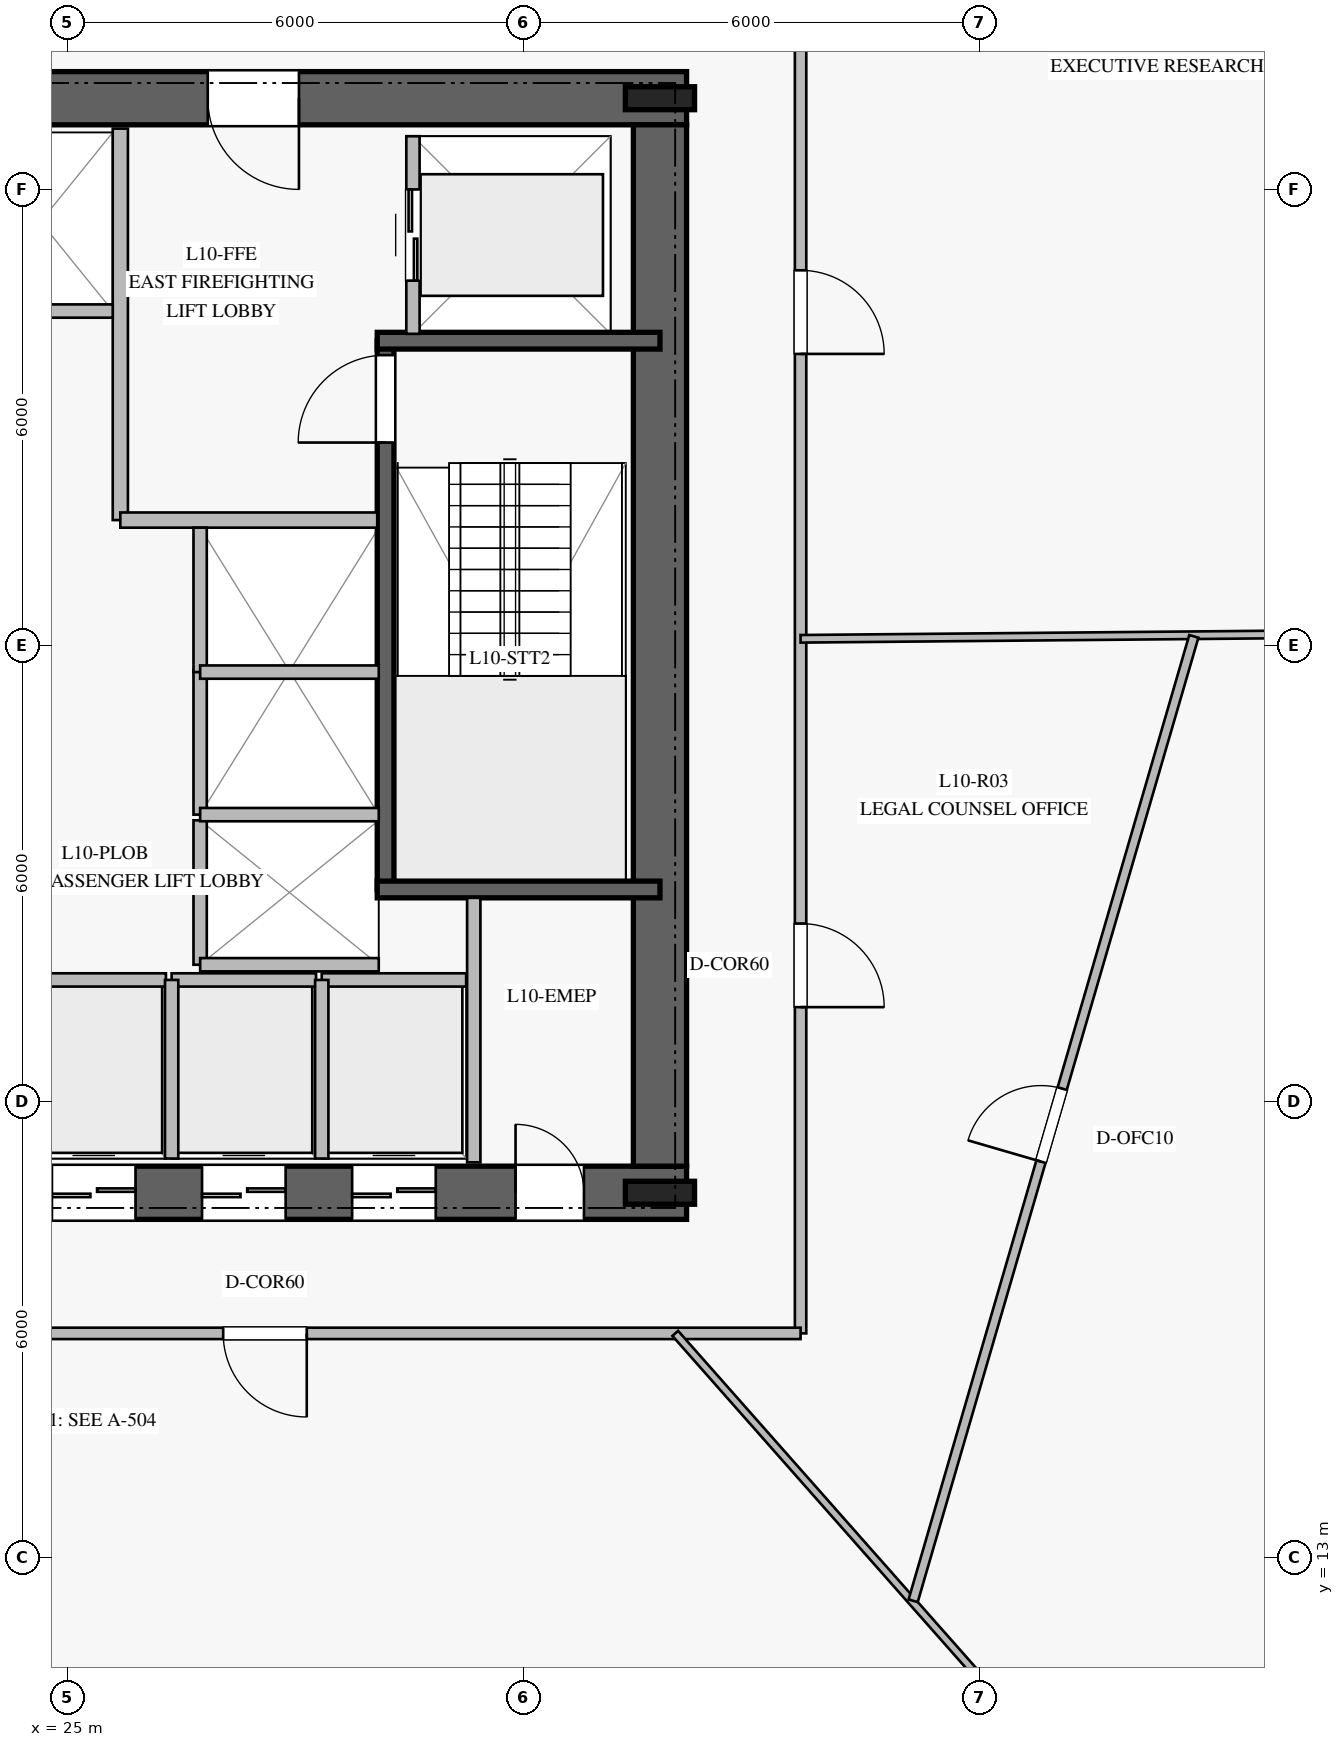
"""IFC4 building model, lengths in metres.
Left out: names, types, materials, properties, quantities, classifications, styles, units other than length and angle.
Written with IfcOpenShell. Run it as: python <this file> out.ifc"""

import sys

from ifc_helpers import new_model, si_unit, direction, frame, frame_2d, origin, origin_2d, place, context, subcontext, project, spatial, rectangle, i_section, extrude, element, fill, save


model = new_model("IFC4")
c1 = context("Model", 3, precision=1e-05, world=origin(), true_north=direction((0.0, 1.0)))
c2 = subcontext(c1, "Body", "Model", "MODEL_VIEW")
j1 = project(units=[si_unit("LENGTHUNIT", "METRE"), si_unit("PLANEANGLEUNIT", "RADIAN")], contexts=[c1])
p1 = place(None, origin())
s1 = spatial("IfcSite", under=j1, at=p1, CompositionType="ELEMENT")
p2 = place(p1, origin())
s2 = spatial("IfcBuilding", under=s1, at=p2, CompositionType="ELEMENT")
p3 = place(p2, frame((0.0, 0.0, 44.0)))
s3 = spatial("IfcBuildingStorey", under=s2, at=p3, CompositionType="ELEMENT", Elevation=44.0)
p4 = place(p3, frame((16.85, 17.8, 0.0), z_axis=(0.0, 0.0, 1.0), x_axis=(1.0, 0.0, 0.0)))
e1 = element("IfcWall", 1, at=p4, inside=s3, PredefinedType="SHEAR", context=c2, shape_type="SweptSolid", body=[
    extrude(rectangle(XDim=16.3, YDim=0.7, at=frame_2d((8.15, 0.0))), origin(), (0.0, 0.0, 1.0), 3.76),
])
p5 = place(p4, frame((5.1, 0.0, 0.0)))
e2 = element("IfcOpeningElement", 2, at=p5, cuts=e1, PredefinedType="OPENING", context=c2, shape_type="SweptSolid", body=[
    extrude(rectangle(XDim=1.2, YDim=2.25, at=frame_2d((0.6, 1.125))), frame((0.0, 0.36, 0.0), z_axis=(0.0, -1.0, 0.0), x_axis=(1.0, 0.0, 0.0)), (0.0, 0.0, 1.0), 0.72),
])
p6 = place(p4, frame((14.05, 0.0, 0.0)))
e3 = element("IfcOpeningElement", 3, at=p6, cuts=e1, PredefinedType="OPENING", context=c2, shape_type="SweptSolid", body=[
    extrude(rectangle(XDim=0.9, YDim=2.1, at=frame_2d((0.45, 1.05))), frame((0.0, 0.36, 0.0), z_axis=(0.0, -1.0, 0.0), x_axis=(1.0, 0.0, 0.0)), (0.0, 0.0, 1.0), 0.72),
])
p7 = place(p4, frame((7.95, 0.0, 0.0)))
e4 = element("IfcOpeningElement", 4, at=p7, cuts=e1, PredefinedType="OPENING", context=c2, shape_type="SweptSolid", body=[
    extrude(rectangle(XDim=1.1, YDim=2.2, at=frame_2d((0.55, 1.1))), frame((0.0, 0.36, 0.0), z_axis=(0.0, -1.0, 0.0), x_axis=(1.0, 0.0, 0.0)), (0.0, 0.0, 1.0), 0.72),
])
p8 = place(p4, frame((9.925, 0.0, 0.0)))
e5 = element("IfcOpeningElement", 5, at=p8, cuts=e1, PredefinedType="OPENING", context=c2, shape_type="SweptSolid", body=[
    extrude(rectangle(XDim=1.1, YDim=2.2, at=frame_2d((0.55, 1.1))), frame((0.0, 0.36, 0.0), z_axis=(0.0, -1.0, 0.0), x_axis=(1.0, 0.0, 0.0)), (0.0, 0.0, 1.0), 0.72),
])
p9 = place(p4, frame((11.9, 0.0, 0.0)))
e6 = element("IfcOpeningElement", 6, at=p9, cuts=e1, PredefinedType="OPENING", context=c2, shape_type="SweptSolid", body=[
    extrude(rectangle(XDim=1.1, YDim=2.2, at=frame_2d((0.55, 1.1))), frame((0.0, 0.36, 0.0), z_axis=(0.0, -1.0, 0.0), x_axis=(1.0, 0.0, 0.0)), (0.0, 0.0, 1.0), 0.72),
])
p10 = place(p3, frame((33.15, 32.2, 0.0), z_axis=(0.0, 0.0, 1.0), x_axis=(-1.0, 0.0, 0.0)))
e7 = element("IfcWall", 7, at=p10, inside=s3, PredefinedType="SHEAR", context=c2, shape_type="SweptSolid", body=[
    extrude(rectangle(XDim=16.3, YDim=0.7, at=frame_2d((8.15, 0.0))), origin(), (0.0, 0.0, 1.0), 3.76),
])
p11 = place(p10, frame((5.1, 0.0, 0.0)))
e8 = element("IfcOpeningElement", 8, at=p11, cuts=e7, PredefinedType="OPENING", context=c2, shape_type="SweptSolid", body=[
    extrude(rectangle(XDim=1.2, YDim=2.25, at=frame_2d((0.6, 1.125))), frame((0.0, 0.36, 0.0), z_axis=(0.0, -1.0, 0.0), x_axis=(1.0, 0.0, 0.0)), (0.0, 0.0, 1.0), 0.72),
])
p12 = place(p3, frame((32.8, 18.15, 0.0), z_axis=(0.0, 0.0, 1.0), x_axis=(0.0, 1.0, 0.0)))
e9 = element("IfcWall", 9, at=p12, inside=s3, PredefinedType="SHEAR", context=c2, shape_type="SweptSolid", body=[
    extrude(rectangle(XDim=13.7, YDim=0.7, at=frame_2d((6.85, 0.0))), origin(), (0.0, 0.0, 1.0), 3.76),
])
for number, where, z_axis, x_axis in (
    (10, (32.8, 17.8, 0.0), (0.0, 0.0, 1.0), (1.0, 0.0, 0.0)),
    (11, (32.8, 32.2, 0.0), (0.0, 0.0, 1.0), (1.0, 0.0, 0.0)),
):
    element("IfcColumn", number, at=place(p3, frame(where, z_axis=z_axis, x_axis=x_axis)), inside=s3, PredefinedType="COLUMN", context=c2, shape_type="SweptSolid", body=[
        extrude(i_section(OverallWidth=0.302, OverallDepth=0.91, WebThickness=0.021, FlangeThickness=0.04, at=origin_2d()), origin(), (0.0, 0.0, 1.0), 4.0),
    ])
p13 = place(p3, frame((29.19, 21.79, 0.0), z_axis=(0.0, 0.0, 1.0), x_axis=(0.0, 1.0, 0.0)))
e12 = element("IfcWall", 12, at=p13, inside=s3, PredefinedType="SOLIDWALL", context=c2, shape_type="SweptSolid", body=[
    extrude(rectangle(XDim=7.22, YDim=0.22, at=frame_2d((3.61, 0.0))), origin(), (0.0, 0.0, 1.0), 3.76),
])
p14 = place(p13, frame((5.88, 0.0, 0.0)))
e13 = element("IfcOpeningElement", 13, at=p14, cuts=e12, PredefinedType="OPENING", context=c2, shape_type="SweptSolid", body=[
    extrude(rectangle(XDim=1.15, YDim=2.2, at=frame_2d((0.575, 1.1))), frame((0.0, 0.12, 0.0), z_axis=(0.0, -1.0, 0.0), x_axis=(1.0, 0.0, 0.0)), (0.0, 0.0, 1.0), 0.24),
])
for number, where, z_axis, x_axis in (
    (14, (29.08, 21.79, 0.0), (0.0, 0.0, 1.0), (1.0, 0.0, 0.0)),
    (15, (29.08, 29.01, 0.0), (0.0, 0.0, 1.0), (1.0, 0.0, 0.0)),
):
    element("IfcWall", number, at=place(p3, frame(where, z_axis=z_axis, x_axis=x_axis)), inside=s3, PredefinedType="SOLIDWALL", context=c2, shape_type="SweptSolid", body=[
        extrude(rectangle(XDim=3.72, YDim=0.22, at=frame_2d((1.86, 0.0))), origin(), (0.0, 0.0, 1.0), 3.76),
    ])
p15 = place(p3, frame((25.7, 26.65, 0.0), z_axis=(0.0, 0.0, 1.0), x_axis=(0.0, 1.0, 0.0)))
e16 = element("IfcWall", 16, at=p15, inside=s3, PredefinedType="PARTITIONING", context=c2, shape_type="SweptSolid", body=[
    extrude(rectangle(XDim=5.15, YDim=0.2, at=frame_2d((2.575, 0.0))), origin(), (0.0, 0.0, 1.0), 3.76),
])
p16 = place(p3, frame((25.7, 26.65, 0.0), z_axis=(0.0, 0.0, 1.0), x_axis=(1.0, 0.0, 0.0)))
e17 = element("IfcWall", 17, at=p16, inside=s3, PredefinedType="PARTITIONING", context=c2, shape_type="SweptSolid", body=[
    extrude(rectangle(XDim=3.38, YDim=0.2, at=frame_2d((1.69, 0.0))), origin(), (0.0, 0.0, 1.0), 3.76),
])
p17 = place(p3, frame((30.35, 18.2, 0.0), z_axis=(0.0, 0.0, 1.0), x_axis=(0.0, 1.0, 0.0)))
e18 = element("IfcWall", 18, at=p17, inside=s3, PredefinedType="PARTITIONING", context=c2, shape_type="SweptSolid", body=[
    extrude(rectangle(XDim=3.48, YDim=0.175, at=frame_2d((1.74, 0.0))), origin(), (0.0, 0.0, 1.0), 3.76),
])
p18 = place(p3, frame((24.4, 20.6, 0.0), z_axis=(0.0, 0.0, 1.0), x_axis=(1.0, 0.0, 0.0)))
e19 = element("IfcWall", 19, at=p18, inside=s3, PredefinedType="PARTITIONING", context=c2, shape_type="SweptSolid", body=[
    extrude(rectangle(XDim=1.9, YDim=0.175, at=frame_2d((0.95, 0.0))), origin(), (0.0, 0.0, 1.0), 3.76),
])
p19 = place(p3, frame((26.375, 20.6, 0.0), z_axis=(0.0, 0.0, 1.0), x_axis=(1.0, 0.0, 0.0)))
e20 = element("IfcWall", 20, at=p19, inside=s3, PredefinedType="PARTITIONING", context=c2, shape_type="SweptSolid", body=[
    extrude(rectangle(XDim=1.9, YDim=0.175, at=frame_2d((0.95, 0.0))), origin(), (0.0, 0.0, 1.0), 3.76),
])
p20 = place(p3, frame((26.375, 18.25, 0.0), z_axis=(0.0, 0.0, 1.0), x_axis=(0.0, 1.0, 0.0)))
e21 = element("IfcWall", 21, at=p20, inside=s3, PredefinedType="PARTITIONING", context=c2, shape_type="SweptSolid", body=[
    extrude(rectangle(XDim=2.35, YDim=0.175, at=frame_2d((1.175, 0.0))), origin(), (0.0, 0.0, 1.0), 3.76),
])
p21 = place(p3, frame((28.35, 20.6, 0.0), z_axis=(0.0, 0.0, 1.0), x_axis=(1.0, 0.0, 0.0)))
e22 = element("IfcWall", 22, at=p21, inside=s3, PredefinedType="PARTITIONING", context=c2, shape_type="SweptSolid", body=[
    extrude(rectangle(XDim=1.9, YDim=0.175, at=frame_2d((0.95, 0.0))), origin(), (0.0, 0.0, 1.0), 3.76),
])
p22 = place(p3, frame((28.35, 18.25, 0.0), z_axis=(0.0, 0.0, 1.0), x_axis=(0.0, 1.0, 0.0)))
e23 = element("IfcWall", 23, at=p22, inside=s3, PredefinedType="PARTITIONING", context=c2, shape_type="SweptSolid", body=[
    extrude(rectangle(XDim=2.35, YDim=0.175, at=frame_2d((1.175, 0.0))), origin(), (0.0, 0.0, 1.0), 3.76),
])
p23 = place(p3, frame((23.7, 29.4, 0.0), z_axis=(0.0, 0.0, 1.0), x_axis=(1.0, 0.0, 0.0)))
e24 = element("IfcWall", 24, at=p23, inside=s3, PredefinedType="PARTITIONING", context=c2, shape_type="SweptSolid", body=[
    extrude(rectangle(XDim=1.9, YDim=0.175, at=frame_2d((0.95, 0.0))), origin(), (0.0, 0.0, 1.0), 3.76),
])
p24 = place(p3, frame((26.75, 20.8, 0.0), z_axis=(0.0, 0.0, 1.0), x_axis=(0.0, 1.0, 0.0)))
e25 = element("IfcWall", 25, at=p24, inside=s3, PredefinedType="PARTITIONING", context=c2, shape_type="SweptSolid", body=[
    extrude(rectangle(XDim=1.9, YDim=0.175, at=frame_2d((0.95, 0.0))), origin(), (0.0, 0.0, 1.0), 3.76),
])
p25 = place(p3, frame((26.75, 20.8, 0.0), z_axis=(0.0, 0.0, 1.0), x_axis=(1.0, 0.0, 0.0)))
e26 = element("IfcWall", 26, at=p25, inside=s3, PredefinedType="PARTITIONING", context=c2, shape_type="SweptSolid", body=[
    extrude(rectangle(XDim=2.35, YDim=0.175, at=frame_2d((1.175, 0.0))), origin(), (0.0, 0.0, 1.0), 3.76),
])
p26 = place(p3, frame((26.75, 22.775, 0.0), z_axis=(0.0, 0.0, 1.0), x_axis=(0.0, 1.0, 0.0)))
e27 = element("IfcWall", 27, at=p26, inside=s3, PredefinedType="PARTITIONING", context=c2, shape_type="SweptSolid", body=[
    extrude(rectangle(XDim=1.9, YDim=0.175, at=frame_2d((0.95, 0.0))), origin(), (0.0, 0.0, 1.0), 3.76),
])
p27 = place(p3, frame((26.75, 22.775, 0.0), z_axis=(0.0, 0.0, 1.0), x_axis=(1.0, 0.0, 0.0)))
e28 = element("IfcWall", 28, at=p27, inside=s3, PredefinedType="PARTITIONING", context=c2, shape_type="SweptSolid", body=[
    extrude(rectangle(XDim=2.35, YDim=0.175, at=frame_2d((1.175, 0.0))), origin(), (0.0, 0.0, 1.0), 3.76),
])
p28 = place(p3, frame((26.75, 24.65, 0.0), z_axis=(0.0, 0.0, 1.0), x_axis=(0.0, 1.0, 0.0)))
e29 = element("IfcWall", 29, at=p28, inside=s3, PredefinedType="PARTITIONING", context=c2, shape_type="SweptSolid", body=[
    extrude(rectangle(XDim=1.9, YDim=0.175, at=frame_2d((0.95, 0.0))), origin(), (0.0, 0.0, 1.0), 3.76),
])
p29 = place(p3, frame((26.75, 24.65, 0.0), z_axis=(0.0, 0.0, 1.0), x_axis=(1.0, 0.0, 0.0)))
e30 = element("IfcWall", 30, at=p29, inside=s3, PredefinedType="PARTITIONING", context=c2, shape_type="SweptSolid", body=[
    extrude(rectangle(XDim=2.35, YDim=0.175, at=frame_2d((1.175, 0.0))), origin(), (0.0, 0.0, 1.0), 3.76),
])
p30 = place(p3, frame((29.55, 29.1, 0.0), z_axis=(0.0, 0.0, 1.0), x_axis=(0.0, 1.0, 0.0)))
e31 = element("IfcWall", 31, at=p30, inside=s3, PredefinedType="PARTITIONING", context=c2, shape_type="SweptSolid", body=[
    extrude(rectangle(XDim=2.6, YDim=0.175, at=frame_2d((1.3, 0.0))), origin(), (0.0, 0.0, 1.0), 3.76),
])
p31 = place(p30, frame((0.7, 0.0, 0.0)))
e32 = element("IfcOpeningElement", 32, at=p31, cuts=e31, PredefinedType="OPENING", context=c2, shape_type="SweptSolid", body=[
    extrude(rectangle(XDim=1.2, YDim=2.2, at=frame_2d((0.6, 1.1))), frame((0.0, 0.098, 0.0), z_axis=(0.0, -1.0, 0.0), x_axis=(1.0, 0.0, 0.0)), (0.0, 0.0, 1.0), 0.195),
])
p32 = place(p3, frame((34.65, 34.05, 0.0), z_axis=(0.0, 0.0, 1.0), x_axis=(0.0, -1.0, 0.0)))
e33 = element("IfcWall", 33, at=p32, inside=s3, PredefinedType="PARTITIONING", context=c2, shape_type="SweptSolid", body=[
    extrude(rectangle(XDim=18.1, YDim=0.15, at=frame_2d((9.05, 0.0))), origin(), (0.0, 0.0, 1.0), 3.21),
])
p33 = place(p32, frame((12.708, 0.0, 0.0)))
e34 = element("IfcOpeningElement", 34, at=p33, cuts=e33, PredefinedType="OPENING", context=c2, shape_type="SweptSolid", body=[
    extrude(rectangle(XDim=1.1, YDim=2.2, at=frame_2d((0.55, 1.1))), frame((0.0, 0.085, 0.0), z_axis=(0.0, -1.0, 0.0), x_axis=(1.0, 0.0, 0.0)), (0.0, 0.0, 1.0), 0.17),
])
p34 = place(p32, frame((4.114, 0.0, 0.0)))
e35 = element("IfcOpeningElement", 35, at=p34, cuts=e33, PredefinedType="OPENING", context=c2, shape_type="SweptSolid", body=[
    extrude(rectangle(XDim=1.1, YDim=2.2, at=frame_2d((0.55, 1.1))), frame((0.0, 0.085, 0.0), z_axis=(0.0, -1.0, 0.0), x_axis=(1.0, 0.0, 0.0)), (0.0, 0.0, 1.0), 0.17),
])
p35 = place(p3, frame((34.65, 15.95, 0.0), z_axis=(0.0, 0.0, 1.0), x_axis=(-1.0, 0.0, 0.0)))
e36 = element("IfcWall", 36, at=p35, inside=s3, PredefinedType="PARTITIONING", context=c2, shape_type="SweptSolid", body=[
    extrude(rectangle(XDim=19.3, YDim=0.15, at=frame_2d((9.65, 0.0))), origin(), (0.0, 0.0, 1.0), 3.21),
])
p36 = place(p35, frame((15.181, 0.0, 0.0)))
e37 = element("IfcOpeningElement", 37, at=p36, cuts=e36, PredefinedType="OPENING", context=c2, shape_type="SweptSolid", body=[
    extrude(rectangle(XDim=1.1, YDim=2.2, at=frame_2d((0.55, 1.1))), frame((0.0, 0.085, 0.0), z_axis=(0.0, -1.0, 0.0), x_axis=(1.0, 0.0, 0.0)), (0.0, 0.0, 1.0), 0.17),
])
p37 = place(p35, frame((6.497, 0.0, 0.0)))
e38 = element("IfcOpeningElement", 38, at=p37, cuts=e36, PredefinedType="OPENING", context=c2, shape_type="SweptSolid", body=[
    extrude(rectangle(XDim=1.1, YDim=2.2, at=frame_2d((0.55, 1.1))), frame((0.0, 0.085, 0.0), z_axis=(0.0, -1.0, 0.0), x_axis=(1.0, 0.0, 0.0)), (0.0, 0.0, 1.0), 0.17),
])
p38 = place(p3, frame((33.001, 15.95, 0.0), z_axis=(0.0, 0.0, 1.0), x_axis=(0.662327291421, -0.749214628153, 0.0)))
e39 = element("IfcWall", 39, at=p38, inside=s3, PredefinedType="MOVABLE", context=c2, shape_type="SweptSolid", body=[
    extrude(rectangle(XDim=11.324, YDim=0.1, at=frame_2d((5.662, 0.0))), origin(), (0.0, 0.0, 1.0), 3.06),
])
p39 = place(p3, frame((34.65, 25.088, 0.0), z_axis=(0.0, 0.0, 1.0), x_axis=(0.999958746777, 0.009083212171, 0.0)))
e40 = element("IfcWall", 40, at=p39, inside=s3, PredefinedType="MOVABLE", context=c2, shape_type="SweptSolid", body=[
    extrude(rectangle(XDim=10.913, YDim=0.1, at=frame_2d((5.456, 0.0))), origin(), (0.0, 0.0, 1.0), 3.76),
])
p40 = place(p3, frame((36.131, 12.432, 0.0), z_axis=(0.0, 0.0, 1.0), x_axis=(0.279451559727, 0.960159791788, 0.0)))
e41 = element("IfcWall", 41, at=p40, inside=s3, PredefinedType="PARTITIONING", context=c2, shape_type="SweptSolid", body=[
    extrude(rectangle(XDim=13.215, YDim=0.125, at=frame_2d((6.607, 0.0))), origin(), (0.0, 0.0, 1.0), 3.21),
])
p41 = place(p40, frame((6.018, 0.0, 0.0)))
e42 = element("IfcOpeningElement", 42, at=p41, cuts=e41, PredefinedType="OPENING", context=c2, shape_type="SweptSolid", body=[
    extrude(rectangle(XDim=1.0, YDim=2.15, at=frame_2d((0.5, 1.075))), frame((0.0, 0.073, 0.0), z_axis=(0.0, -1.0, 0.0), x_axis=(1.0, 0.0, 0.0)), (0.0, 0.0, 1.0), 0.145),
])
p42 = place(p14, origin())
e43 = element("IfcDoor", 43, at=p42, inside=s3, OperationType="SINGLE_SWING_LEFT", PredefinedType="DOOR", context=c2, shape_type="SweptSolid", body=[
    extrude(rectangle(XDim=1.15, YDim=2.2, at=frame_2d((0.575, 1.1))), frame((0.0, 0.025, 0.0), z_axis=(0.0, -1.0, 0.0), x_axis=(1.0, 0.0, 0.0)), (0.0, 0.0, 1.0), 0.05),
])
fill(e13, e43)
p43 = place(p11, origin())
e44 = element("IfcDoor", 44, at=p43, inside=s3, OperationType="SINGLE_SWING_LEFT", PredefinedType="DOOR", context=c2, shape_type="SweptSolid", body=[
    extrude(rectangle(XDim=1.2, YDim=2.25, at=frame_2d((0.6, 1.125))), frame((0.0, 0.025, 0.0), z_axis=(0.0, -1.0, 0.0), x_axis=(1.0, 0.0, 0.0)), (0.0, 0.0, 1.0), 0.05),
])
fill(e8, e44)
p44 = place(p6, origin())
e45 = element("IfcDoor", 45, at=p44, inside=s3, OperationType="SINGLE_SWING_LEFT", PredefinedType="DOOR", context=c2, shape_type="SweptSolid", body=[
    extrude(rectangle(XDim=0.9, YDim=2.1, at=frame_2d((0.45, 1.05))), frame((0.0, 0.025, 0.0), z_axis=(0.0, -1.0, 0.0), x_axis=(1.0, 0.0, 0.0)), (0.0, 0.0, 1.0), 0.05),
])
fill(e3, e45)
p45 = place(p7, origin())
e46 = element("IfcDoor", 46, at=p45, inside=s3, OperationType="DOUBLE_DOOR_SLIDING", PredefinedType="DOOR", context=c2, shape_type="SweptSolid", body=[
    extrude(rectangle(XDim=1.1, YDim=2.2, at=frame_2d((0.55, 1.1))), frame((0.0, 0.025, 0.0), z_axis=(0.0, -1.0, 0.0), x_axis=(1.0, 0.0, 0.0)), (0.0, 0.0, 1.0), 0.05),
])
fill(e4, e46)
p46 = place(p8, origin())
e47 = element("IfcDoor", 47, at=p46, inside=s3, OperationType="DOUBLE_DOOR_SLIDING", PredefinedType="DOOR", context=c2, shape_type="SweptSolid", body=[
    extrude(rectangle(XDim=1.1, YDim=2.2, at=frame_2d((0.55, 1.1))), frame((0.0, 0.025, 0.0), z_axis=(0.0, -1.0, 0.0), x_axis=(1.0, 0.0, 0.0)), (0.0, 0.0, 1.0), 0.05),
])
fill(e5, e47)
p47 = place(p9, origin())
e48 = element("IfcDoor", 48, at=p47, inside=s3, OperationType="DOUBLE_DOOR_SLIDING", PredefinedType="DOOR", context=c2, shape_type="SweptSolid", body=[
    extrude(rectangle(XDim=1.1, YDim=2.2, at=frame_2d((0.55, 1.1))), frame((0.0, 0.025, 0.0), z_axis=(0.0, -1.0, 0.0), x_axis=(1.0, 0.0, 0.0)), (0.0, 0.0, 1.0), 0.05),
])
fill(e6, e48)
p48 = place(p31, origin())
e49 = element("IfcDoor", 49, at=p48, inside=s3, OperationType="DOUBLE_DOOR_SLIDING", PredefinedType="DOOR", context=c2, shape_type="SweptSolid", body=[
    extrude(rectangle(XDim=1.2, YDim=2.2, at=frame_2d((0.6, 1.1))), frame((0.0, 0.025, 0.0), z_axis=(0.0, -1.0, 0.0), x_axis=(1.0, 0.0, 0.0)), (0.0, 0.0, 1.0), 0.05),
])
fill(e32, e49)
p49 = place(p37, origin())
e50 = element("IfcDoor", 50, at=p49, inside=s3, OperationType="SINGLE_SWING_LEFT", PredefinedType="DOOR", context=c2, shape_type="SweptSolid", body=[
    extrude(rectangle(XDim=1.1, YDim=2.2, at=frame_2d((0.55, 1.1))), frame((0.0, 0.025, 0.0), z_axis=(0.0, -1.0, 0.0), x_axis=(1.0, 0.0, 0.0)), (0.0, 0.0, 1.0), 0.05),
])
fill(e38, e50)
p50 = place(p33, origin())
e51 = element("IfcDoor", 51, at=p50, inside=s3, OperationType="SINGLE_SWING_RIGHT", PredefinedType="DOOR", context=c2, shape_type="SweptSolid", body=[
    extrude(rectangle(XDim=1.1, YDim=2.2, at=frame_2d((0.55, 1.1))), frame((0.0, 0.025, 0.0), z_axis=(0.0, -1.0, 0.0), x_axis=(1.0, 0.0, 0.0)), (0.0, 0.0, 1.0), 0.05),
])
fill(e34, e51)
p51 = place(p41, origin())
e52 = element("IfcDoor", 52, at=p51, inside=s3, OperationType="SINGLE_SWING_LEFT", PredefinedType="DOOR", context=c2, shape_type="SweptSolid", body=[
    extrude(rectangle(XDim=1.0, YDim=2.15, at=frame_2d((0.5, 1.075))), frame((0.0, 0.025, 0.0), z_axis=(0.0, -1.0, 0.0), x_axis=(1.0, 0.0, 0.0)), (0.0, 0.0, 1.0), 0.05),
])
fill(e42, e52)
p52 = place(p34, origin())
e53 = element("IfcDoor", 53, at=p52, inside=s3, OperationType="SINGLE_SWING_RIGHT", PredefinedType="DOOR", context=c2, shape_type="SweptSolid", body=[
    extrude(rectangle(XDim=1.1, YDim=2.2, at=frame_2d((0.55, 1.1))), frame((0.0, 0.025, 0.0), z_axis=(0.0, -1.0, 0.0), x_axis=(1.0, 0.0, 0.0)), (0.0, 0.0, 1.0), 0.05),
])
fill(e35, e53)
save(model, sys.argv[1])
